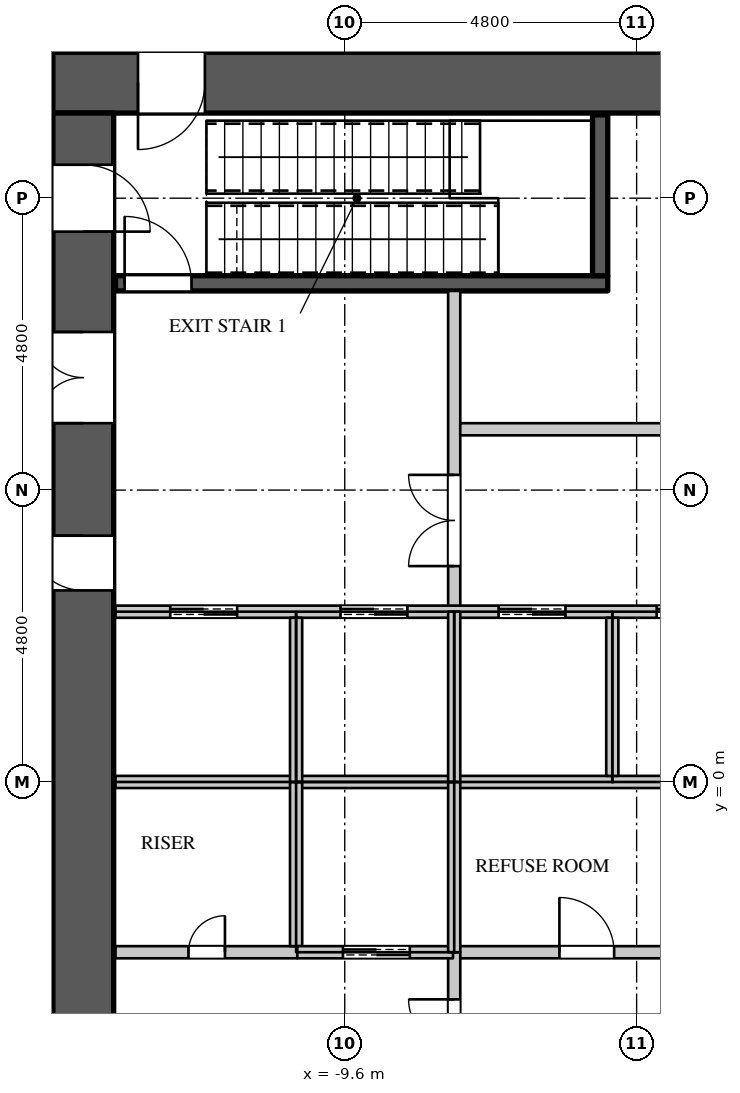
"""IFC4 building model, lengths in metres.
Left out: names, types, materials, properties, quantities, classifications, styles, units other than length and angle.
Written with IfcOpenShell. Run it as: python <this file> out.ifc"""

import sys

from ifc_helpers import new_model, si_unit, direction, frame, frame_2d, origin, place, context, subcontext, project, spatial, rectangle, extrude, element, fill, save


model = new_model("IFC4")
c1 = context("Model", 3, precision=1e-05, world=origin(), true_north=direction((0.0, 1.0)))
c2 = subcontext(c1, "Body", "Model", "MODEL_VIEW")
j1 = project(units=[si_unit("LENGTHUNIT", "METRE"), si_unit("PLANEANGLEUNIT", "RADIAN")], contexts=[c1])
p1 = place(None, origin())
s1 = spatial("IfcSite", under=j1, at=p1, CompositionType="ELEMENT")
p2 = place(p1, origin())
s2 = spatial("IfcBuilding", under=s1, at=p2, CompositionType="ELEMENT")
p3 = place(p2, frame((0.0, 0.0, 101.1)))
s3 = spatial("IfcBuildingStorey", under=s2, at=p3, CompositionType="ELEMENT", Elevation=101.1)
p4 = place(p3, frame((-14.4, 11.5, 0.0), z_axis=(0.0, 0.0, 1.0), x_axis=(1.0, 0.0, 0.0)))
e1 = element("IfcWall", 1, at=p4, inside=s3, PredefinedType="SHEAR", context=c2, shape_type="SweptSolid", body=[
    extrude(rectangle(XDim=28.8, YDim=1.0, at=frame_2d((14.4, 0.0))), origin(), (0.0, 0.0, 1.0), 5.4),
])
p5 = place(p4, frame((1.4, 0.0, 0.0)))
e2 = element("IfcOpeningElement", 2, at=p5, cuts=e1, PredefinedType="OPENING", context=c2, shape_type="SweptSolid", body=[
    extrude(rectangle(XDim=1.1, YDim=2.2, at=frame_2d((0.55, 1.1))), frame((0.0, 0.51, 0.0), z_axis=(0.0, -1.0, 0.0), x_axis=(1.0, 0.0, 0.0)), (0.0, 0.0, 1.0), 1.02),
])
p6 = place(p4, frame((26.3, 0.0, 0.0)))
e3 = element("IfcOpeningElement", 3, at=p6, cuts=e1, PredefinedType="OPENING", context=c2, shape_type="SweptSolid", body=[
    extrude(rectangle(XDim=1.1, YDim=2.2, at=frame_2d((0.55, 1.1))), frame((0.0, 0.51, 0.0), z_axis=(0.0, -1.0, 0.0), x_axis=(1.0, 0.0, 0.0)), (0.0, 0.0, 1.0), 1.02),
])
p7 = place(p4, frame((11.2, 0.0, 0.0)))
e4 = element("IfcOpeningElement", 4, at=p7, cuts=e1, PredefinedType="OPENING", context=c2, shape_type="SweptSolid", body=[
    extrude(rectangle(XDim=1.8, YDim=2.4, at=frame_2d((0.9, 1.2))), frame((0.0, 0.51, 0.0), z_axis=(0.0, -1.0, 0.0), x_axis=(1.0, 0.0, 0.0)), (0.0, 0.0, 1.0), 1.02),
])
p8 = place(p3, frame((-13.9, -11.0, 0.0), z_axis=(0.0, 0.0, 1.0), x_axis=(0.0, 1.0, 0.0)))
e5 = element("IfcWall", 5, at=p8, inside=s3, PredefinedType="SHEAR", context=c2, shape_type="SweptSolid", body=[
    extrude(rectangle(XDim=22.0, YDim=1.0, at=frame_2d((11.0, 0.0))), origin(), (0.0, 0.0, 1.0), 5.4),
])
p9 = place(p8, frame((16.9, 0.0, 0.0)))
e6 = element("IfcOpeningElement", 6, at=p9, cuts=e5, PredefinedType="OPENING", context=c2, shape_type="SweptSolid", body=[
    extrude(rectangle(XDim=1.5, YDim=2.4, at=frame_2d((0.75, 1.2))), frame((0.0, 0.51, 0.0), z_axis=(0.0, -1.0, 0.0), x_axis=(1.0, 0.0, 0.0)), (0.0, 0.0, 1.0), 1.02),
])
p10 = place(p8, frame((20.05, 0.0, 0.0)))
e7 = element("IfcOpeningElement", 7, at=p10, cuts=e5, PredefinedType="OPENING", context=c2, shape_type="SweptSolid", body=[
    extrude(rectangle(XDim=1.1, YDim=2.2, at=frame_2d((0.55, 1.1))), frame((0.0, 0.51, 0.0), z_axis=(0.0, -1.0, 0.0), x_axis=(1.0, 0.0, 0.0)), (0.0, 0.0, 1.0), 1.02),
])
p11 = place(p8, frame((14.15, 0.0, 0.0)))
e8 = element("IfcOpeningElement", 8, at=p11, cuts=e5, PredefinedType="OPENING", context=c2, shape_type="SweptSolid", body=[
    extrude(rectangle(XDim=0.9, YDim=2.2, at=frame_2d((0.45, 1.1))), frame((0.0, 0.51, 0.0), z_axis=(0.0, -1.0, 0.0), x_axis=(1.0, 0.0, 0.0)), (0.0, 0.0, 1.0), 1.02),
])
p12 = place(p8, frame((3.55, 0.0, 0.0)))
e9 = element("IfcOpeningElement", 9, at=p12, cuts=e5, PredefinedType="OPENING", context=c2, shape_type="SweptSolid", body=[
    extrude(rectangle(XDim=1.5, YDim=2.4, at=frame_2d((0.75, 1.2))), frame((0.0, 0.51, 0.0), z_axis=(0.0, -1.0, 0.0), x_axis=(1.0, 0.0, 0.0)), (0.0, 0.0, 1.0), 1.02),
])
p13 = place(p8, frame((0.85, 0.0, 0.0)))
e10 = element("IfcOpeningElement", 10, at=p13, cuts=e5, PredefinedType="OPENING", context=c2, shape_type="SweptSolid", body=[
    extrude(rectangle(XDim=1.1, YDim=2.2, at=frame_2d((0.55, 1.1))), frame((0.0, 0.51, 0.0), z_axis=(0.0, -1.0, 0.0), x_axis=(1.0, 0.0, 0.0)), (0.0, 0.0, 1.0), 1.02),
])
p14 = place(p3, frame((-7.82, -2.8, 0.0), z_axis=(0.0, 0.0, 1.0), x_axis=(1.0, 0.0, 0.0)))
e11 = element("IfcWall", 11, at=p14, inside=s3, PredefinedType="PARTITIONING", context=c2, shape_type="SweptSolid", body=[
    extrude(rectangle(XDim=4.44, YDim=0.2, at=frame_2d((2.22, 0.0))), origin(), (0.0, 0.0, 1.0), 5.15),
])
p15 = place(p14, frame((1.75, 0.0, 0.0)))
e12 = element("IfcOpeningElement", 12, at=p15, cuts=e11, PredefinedType="OPENING", context=c2, shape_type="SweptSolid", body=[
    extrude(rectangle(XDim=0.9, YDim=2.2, at=frame_2d((0.45, 1.1))), frame((0.0, 0.11, 0.0), z_axis=(0.0, -1.0, 0.0), x_axis=(1.0, 0.0, 0.0)), (0.0, 0.0, 1.0), 0.22),
])
p16 = place(p3, frame((-7.8, -8.075, 0.0), z_axis=(0.0, 0.0, 1.0), x_axis=(0.0, 1.0, 0.0)))
e13 = element("IfcWall", 13, at=p16, inside=s3, PredefinedType="PARTITIONING", context=c2, shape_type="SweptSolid", body=[
    extrude(rectangle(XDim=5.275, YDim=0.2, at=frame_2d((2.637, 0.0))), origin(), (0.0, 0.0, 1.0), 5.15),
])
p17 = place(p16, frame((3.0, 0.0, 0.0)))
e14 = element("IfcOpeningElement", 14, at=p17, cuts=e13, PredefinedType="OPENING", context=c2, shape_type="SweptSolid", body=[
    extrude(rectangle(XDim=1.5, YDim=2.4, at=frame_2d((0.75, 1.2))), frame((0.0, 0.11, 0.0), z_axis=(0.0, -1.0, 0.0), x_axis=(1.0, 0.0, 0.0)), (0.0, 0.0, 1.0), 0.22),
])
p18 = place(p3, frame((-7.8, 2.8, 0.0), z_axis=(0.0, 0.0, 1.0), x_axis=(0.0, 1.0, 0.0)))
e15 = element("IfcWall", 15, at=p18, inside=s3, PredefinedType="PARTITIONING", context=c2, shape_type="SweptSolid", body=[
    extrude(rectangle(XDim=5.275, YDim=0.2, at=frame_2d((2.637, 0.0))), origin(), (0.0, 0.0, 1.0), 5.15),
])
p19 = place(p18, frame((0.75, 0.0, 0.0)))
e16 = element("IfcOpeningElement", 16, at=p19, cuts=e15, PredefinedType="OPENING", context=c2, shape_type="SweptSolid", body=[
    extrude(rectangle(XDim=1.5, YDim=2.4, at=frame_2d((0.75, 1.2))), frame((0.0, 0.11, 0.0), z_axis=(0.0, -1.0, 0.0), x_axis=(1.0, 0.0, 0.0)), (0.0, 0.0, 1.0), 0.22),
])
p20 = place(p3, frame((-7.7, 5.8, 0.0), z_axis=(0.0, 0.0, 1.0), x_axis=(1.0, 0.0, 0.0)))
e17 = element("IfcWall", 17, at=p20, inside=s3, PredefinedType="PARTITIONING", context=c2, shape_type="SweptSolid", body=[
    extrude(rectangle(XDim=21.07, YDim=0.2, at=frame_2d((10.535, 0.0))), origin(), (0.0, 0.0, 1.0), 5.15),
])
p21 = place(p20, frame((3.35, 0.0, 0.0)))
e18 = element("IfcOpeningElement", 18, at=p21, cuts=e17, PredefinedType="OPENING", context=c2, shape_type="SweptSolid", body=[
    extrude(rectangle(XDim=0.9, YDim=2.2, at=frame_2d((0.45, 1.1))), frame((0.0, 0.11, 0.0), z_axis=(0.0, -1.0, 0.0), x_axis=(1.0, 0.0, 0.0)), (0.0, 0.0, 1.0), 0.22),
])
p22 = place(p20, frame((9.5, 0.0, 0.0)))
e19 = element("IfcOpeningElement", 19, at=p22, cuts=e17, PredefinedType="OPENING", context=c2, shape_type="SweptSolid", body=[
    extrude(rectangle(XDim=0.9, YDim=2.2, at=frame_2d((0.45, 1.1))), frame((0.0, 0.11, 0.0), z_axis=(0.0, -1.0, 0.0), x_axis=(1.0, 0.0, 0.0)), (0.0, 0.0, 1.0), 0.22),
])
p23 = place(p20, frame((16.25, 0.0, 0.0)))
e20 = element("IfcOpeningElement", 20, at=p23, cuts=e17, PredefinedType="OPENING", context=c2, shape_type="SweptSolid", body=[
    extrude(rectangle(XDim=0.9, YDim=2.2, at=frame_2d((0.45, 1.1))), frame((0.0, 0.11, 0.0), z_axis=(0.0, -1.0, 0.0), x_axis=(1.0, 0.0, 0.0)), (0.0, 0.0, 1.0), 0.22),
])
p24 = place(p3, frame((-13.37, -2.8, 0.0), z_axis=(0.0, 0.0, 1.0), x_axis=(1.0, 0.0, 0.0)))
e21 = element("IfcWall", 21, at=p24, inside=s3, PredefinedType="PARTITIONING", context=c2, shape_type="SweptSolid", body=[
    extrude(rectangle(XDim=2.99, YDim=0.2, at=frame_2d((1.495, 0.0))), origin(), (0.0, 0.0, 1.0), 5.15),
])
p25 = place(p24, frame((1.2, 0.0, 0.0)))
e22 = element("IfcOpeningElement", 22, at=p25, cuts=e21, PredefinedType="OPENING", context=c2, shape_type="SweptSolid", body=[
    extrude(rectangle(XDim=0.6, YDim=2.0, at=frame_2d((0.3, 1.0))), frame((0.0, 0.11, 0.0), z_axis=(0.0, -1.0, 0.0), x_axis=(1.0, 0.0, 0.0)), (0.0, 0.0, 1.0), 0.22),
])
p26 = place(p3, frame((-13.37, 0.0, 0.0), z_axis=(0.0, 0.0, 1.0), x_axis=(1.0, 0.0, 0.0)))
e23 = element("IfcWall", 23, at=p26, inside=s3, PredefinedType="PARTITIONING", context=c2, shape_type="SweptSolid", body=[
    extrude(rectangle(XDim=23.77, YDim=0.2, at=frame_2d((11.885, 0.0))), origin(), (0.0, 0.0, 1.0), 5.15),
])
p27 = place(p3, frame((-13.37, 2.8, 0.0), z_axis=(0.0, 0.0, 1.0), x_axis=(1.0, 0.0, 0.0)))
e24 = element("IfcWall", 24, at=p27, inside=s3, PredefinedType="PARTITIONING", context=c2, shape_type="SweptSolid", body=[
    extrude(rectangle(XDim=23.77, YDim=0.2, at=frame_2d((11.885, 0.0))), origin(), (0.0, 0.0, 1.0), 5.15),
])
p28 = place(p27, frame((0.9, 0.0, 0.0)))
e25 = element("IfcOpeningElement", 25, at=p28, cuts=e24, PredefinedType="OPENING", context=c2, shape_type="SweptSolid", body=[
    extrude(rectangle(XDim=1.1, YDim=2.2, at=frame_2d((0.55, 1.1))), frame((0.0, 0.11, 0.0), z_axis=(0.0, -1.0, 0.0), x_axis=(1.0, 0.0, 0.0)), (0.0, 0.0, 1.0), 0.22),
])
p29 = place(p27, frame((3.7, 0.0, 0.0)))
e26 = element("IfcOpeningElement", 26, at=p29, cuts=e24, PredefinedType="OPENING", context=c2, shape_type="SweptSolid", body=[
    extrude(rectangle(XDim=1.1, YDim=2.2, at=frame_2d((0.55, 1.1))), frame((0.0, 0.11, 0.0), z_axis=(0.0, -1.0, 0.0), x_axis=(1.0, 0.0, 0.0)), (0.0, 0.0, 1.0), 0.22),
])
p30 = place(p27, frame((6.3, 0.0, 0.0)))
e27 = element("IfcOpeningElement", 27, at=p30, cuts=e24, PredefinedType="OPENING", context=c2, shape_type="SweptSolid", body=[
    extrude(rectangle(XDim=1.1, YDim=2.2, at=frame_2d((0.55, 1.1))), frame((0.0, 0.11, 0.0), z_axis=(0.0, -1.0, 0.0), x_axis=(1.0, 0.0, 0.0)), (0.0, 0.0, 1.0), 0.22),
])
p31 = place(p27, frame((8.9, 0.0, 0.0)))
e28 = element("IfcOpeningElement", 28, at=p31, cuts=e24, PredefinedType="OPENING", context=c2, shape_type="SweptSolid", body=[
    extrude(rectangle(XDim=1.1, YDim=2.2, at=frame_2d((0.55, 1.1))), frame((0.0, 0.11, 0.0), z_axis=(0.0, -1.0, 0.0), x_axis=(1.0, 0.0, 0.0)), (0.0, 0.0, 1.0), 0.22),
])
p32 = place(p27, frame((11.5, 0.0, 0.0)))
e29 = element("IfcOpeningElement", 29, at=p32, cuts=e24, PredefinedType="OPENING", context=c2, shape_type="SweptSolid", body=[
    extrude(rectangle(XDim=1.1, YDim=2.2, at=frame_2d((0.55, 1.1))), frame((0.0, 0.11, 0.0), z_axis=(0.0, -1.0, 0.0), x_axis=(1.0, 0.0, 0.0)), (0.0, 0.0, 1.0), 0.22),
])
p33 = place(p27, frame((14.1, 0.0, 0.0)))
e30 = element("IfcOpeningElement", 30, at=p33, cuts=e24, PredefinedType="OPENING", context=c2, shape_type="SweptSolid", body=[
    extrude(rectangle(XDim=1.1, YDim=2.2, at=frame_2d((0.55, 1.1))), frame((0.0, 0.11, 0.0), z_axis=(0.0, -1.0, 0.0), x_axis=(1.0, 0.0, 0.0)), (0.0, 0.0, 1.0), 0.22),
])
p34 = place(p27, frame((16.7, 0.0, 0.0)))
e31 = element("IfcOpeningElement", 31, at=p34, cuts=e24, PredefinedType="OPENING", context=c2, shape_type="SweptSolid", body=[
    extrude(rectangle(XDim=1.1, YDim=2.2, at=frame_2d((0.55, 1.1))), frame((0.0, 0.11, 0.0), z_axis=(0.0, -1.0, 0.0), x_axis=(1.0, 0.0, 0.0)), (0.0, 0.0, 1.0), 0.22),
])
p35 = place(p27, frame((19.3, 0.0, 0.0)))
e32 = element("IfcOpeningElement", 32, at=p35, cuts=e24, PredefinedType="OPENING", context=c2, shape_type="SweptSolid", body=[
    extrude(rectangle(XDim=1.1, YDim=2.2, at=frame_2d((0.55, 1.1))), frame((0.0, 0.11, 0.0), z_axis=(0.0, -1.0, 0.0), x_axis=(1.0, 0.0, 0.0)), (0.0, 0.0, 1.0), 0.22),
])
p36 = place(p3, frame((-10.4, -2.7, 0.0), z_axis=(0.0, 0.0, 1.0), x_axis=(0.0, 1.0, 0.0)))
e33 = element("IfcWall", 33, at=p36, inside=s3, PredefinedType="PARTITIONING", context=c2, shape_type="SweptSolid", body=[
    extrude(rectangle(XDim=2.7, YDim=0.2, at=frame_2d((1.35, 0.0))), origin(), (0.0, 0.0, 1.0), 5.15),
])
p37 = place(p3, frame((-10.38, -2.8, 0.0), z_axis=(0.0, 0.0, 1.0), x_axis=(1.0, 0.0, 0.0)))
e34 = element("IfcWall", 34, at=p37, inside=s3, PredefinedType="PARTITIONING", context=c2, shape_type="SweptSolid", body=[
    extrude(rectangle(XDim=2.56, YDim=0.2, at=frame_2d((1.28, 0.0))), origin(), (0.0, 0.0, 1.0), 5.15),
])
p38 = place(p37, frame((0.75, 0.0, 0.0)))
e35 = element("IfcOpeningElement", 35, at=p38, cuts=e34, PredefinedType="OPENING", context=c2, shape_type="SweptSolid", body=[
    extrude(rectangle(XDim=1.1, YDim=2.2, at=frame_2d((0.55, 1.1))), frame((0.0, 0.11, 0.0), z_axis=(0.0, -1.0, 0.0), x_axis=(1.0, 0.0, 0.0)), (0.0, 0.0, 1.0), 0.22),
])
p39 = place(p3, frame((-10.4, 0.0, 0.0), z_axis=(0.0, 0.0, 1.0), x_axis=(0.0, 1.0, 0.0)))
e36 = element("IfcWall", 36, at=p39, inside=s3, PredefinedType="PARTITIONING", context=c2, shape_type="SweptSolid", body=[
    extrude(rectangle(XDim=2.7, YDim=0.2, at=frame_2d((1.35, 0.0))), origin(), (0.0, 0.0, 1.0), 5.15),
])
for number, where, z_axis, x_axis in (
    (37, (-7.8, -2.8, 0.0), (0.0, 0.0, 1.0), (0.0, 1.0, 0.0)),
    (38, (-7.8, 0.0, 0.0), (0.0, 0.0, 1.0), (0.0, 1.0, 0.0)),
):
    element("IfcWall", number, at=place(p3, frame(where, z_axis=z_axis, x_axis=x_axis)), inside=s3, PredefinedType="PARTITIONING", context=c2, shape_type="SweptSolid", body=[
        extrude(rectangle(XDim=2.8, YDim=0.2, at=frame_2d((1.4, 0.0))), origin(), (0.0, 0.0, 1.0), 5.15),
    ])
p40 = place(p3, frame((-5.2, 0.1, 0.0), z_axis=(0.0, 0.0, 1.0), x_axis=(0.0, 1.0, 0.0)))
e39 = element("IfcWall", 39, at=p40, inside=s3, PredefinedType="PARTITIONING", context=c2, shape_type="SweptSolid", body=[
    extrude(rectangle(XDim=2.6, YDim=0.2, at=frame_2d((1.3, 0.0))), origin(), (0.0, 0.0, 1.0), 5.15),
])
p41 = place(p3, frame((-13.37, 8.2, 0.0), z_axis=(0.0, 0.0, 1.0), x_axis=(1.0, 0.0, 0.0)))
e40 = element("IfcWall", 40, at=p41, inside=s3, PredefinedType="SHEAR", context=c2, shape_type="SweptSolid", body=[
    extrude(rectangle(XDim=8.095, YDim=0.25, at=frame_2d((4.048, 0.0))), origin(), (0.0, 0.0, 1.0), 5.15),
])
p42 = place(p41, frame((0.15, 0.0, 0.0)))
e41 = element("IfcOpeningElement", 41, at=p42, cuts=e40, PredefinedType="OPENING", context=c2, shape_type="SweptSolid", body=[
    extrude(rectangle(XDim=1.1, YDim=2.2, at=frame_2d((0.55, 1.1))), frame((0.0, 0.135, 0.0), z_axis=(0.0, -1.0, 0.0), x_axis=(1.0, 0.0, 0.0)), (0.0, 0.0, 1.0), 0.27),
])
p43 = place(p3, frame((-5.4, 8.325, 0.0), z_axis=(0.0, 0.0, 1.0), x_axis=(0.0, 1.0, 0.0)))
e42 = element("IfcWall", 42, at=p43, inside=s3, PredefinedType="SHEAR", context=c2, shape_type="SweptSolid", body=[
    extrude(rectangle(XDim=2.645, YDim=0.25, at=frame_2d((1.323, 0.0))), origin(), (0.0, 0.0, 1.0), 5.15),
])
p44 = place(p25, origin())
e43 = element("IfcDoor", 43, at=p44, inside=s3, OperationType="SINGLE_SWING_RIGHT", PredefinedType="DOOR", context=c2, shape_type="SweptSolid", body=[
    extrude(rectangle(XDim=0.6, YDim=2.0, at=frame_2d((0.3, 1.0))), frame((0.0, 0.025, 0.0), z_axis=(0.0, -1.0, 0.0), x_axis=(1.0, 0.0, 0.0)), (0.0, 0.0, 1.0), 0.05),
])
fill(e22, e43)
p45 = place(p15, origin())
e44 = element("IfcDoor", 44, at=p45, inside=s3, OperationType="SINGLE_SWING_LEFT", PredefinedType="DOOR", context=c2, shape_type="SweptSolid", body=[
    extrude(rectangle(XDim=0.9, YDim=2.2, at=frame_2d((0.45, 1.1))), frame((0.0, 0.025, 0.0), z_axis=(0.0, -1.0, 0.0), x_axis=(1.0, 0.0, 0.0)), (0.0, 0.0, 1.0), 0.05),
])
fill(e12, e44)
p46 = place(p28, origin())
e45 = element("IfcDoor", 45, at=p46, inside=s3, OperationType="DOUBLE_DOOR_SLIDING", PredefinedType="DOOR", context=c2, shape_type="SweptSolid", body=[
    extrude(rectangle(XDim=1.1, YDim=2.2, at=frame_2d((0.55, 1.1))), frame((0.0, 0.025, 0.0), z_axis=(0.0, -1.0, 0.0), x_axis=(1.0, 0.0, 0.0)), (0.0, 0.0, 1.0), 0.05),
])
fill(e25, e45)
p47 = place(p29, origin())
e46 = element("IfcDoor", 46, at=p47, inside=s3, OperationType="DOUBLE_DOOR_SLIDING", PredefinedType="DOOR", context=c2, shape_type="SweptSolid", body=[
    extrude(rectangle(XDim=1.1, YDim=2.2, at=frame_2d((0.55, 1.1))), frame((0.0, 0.025, 0.0), z_axis=(0.0, -1.0, 0.0), x_axis=(1.0, 0.0, 0.0)), (0.0, 0.0, 1.0), 0.05),
])
fill(e26, e46)
p48 = place(p38, origin())
e47 = element("IfcDoor", 47, at=p48, inside=s3, OperationType="DOUBLE_DOOR_SLIDING", PredefinedType="DOOR", context=c2, shape_type="SweptSolid", body=[
    extrude(rectangle(XDim=1.1, YDim=2.2, at=frame_2d((0.55, 1.1))), frame((0.0, 0.025, 0.0), z_axis=(0.0, -1.0, 0.0), x_axis=(1.0, 0.0, 0.0)), (0.0, 0.0, 1.0), 0.05),
])
fill(e35, e47)
p49 = place(p30, origin())
e48 = element("IfcDoor", 48, at=p49, inside=s3, OperationType="DOUBLE_DOOR_SLIDING", PredefinedType="DOOR", context=c2, shape_type="SweptSolid", body=[
    extrude(rectangle(XDim=1.1, YDim=2.2, at=frame_2d((0.55, 1.1))), frame((0.0, 0.025, 0.0), z_axis=(0.0, -1.0, 0.0), x_axis=(1.0, 0.0, 0.0)), (0.0, 0.0, 1.0), 0.05),
])
fill(e27, e48)
p50 = place(p31, origin())
e49 = element("IfcDoor", 49, at=p50, inside=s3, OperationType="DOUBLE_DOOR_SLIDING", PredefinedType="DOOR", context=c2, shape_type="SweptSolid", body=[
    extrude(rectangle(XDim=1.1, YDim=2.2, at=frame_2d((0.55, 1.1))), frame((0.0, 0.025, 0.0), z_axis=(0.0, -1.0, 0.0), x_axis=(1.0, 0.0, 0.0)), (0.0, 0.0, 1.0), 0.05),
])
fill(e28, e49)
p51 = place(p42, origin())
e50 = element("IfcDoor", 50, at=p51, inside=s3, OperationType="SINGLE_SWING_LEFT", PredefinedType="DOOR", context=c2, shape_type="SweptSolid", body=[
    extrude(rectangle(XDim=1.1, YDim=2.2, at=frame_2d((0.55, 1.1))), frame((0.0, 0.025, 0.0), z_axis=(0.0, -1.0, 0.0), x_axis=(1.0, 0.0, 0.0)), (0.0, 0.0, 1.0), 0.05),
])
fill(e41, e50)
p52 = place(p19, origin())
e51 = element("IfcDoor", 51, at=p52, inside=s3, OperationType="DOUBLE_DOOR_SINGLE_SWING", PredefinedType="DOOR", context=c2, shape_type="SweptSolid", body=[
    extrude(rectangle(XDim=1.5, YDim=2.4, at=frame_2d((0.75, 1.2))), frame((0.0, 0.025, 0.0), z_axis=(0.0, -1.0, 0.0), x_axis=(1.0, 0.0, 0.0)), (0.0, 0.0, 1.0), 0.05),
])
fill(e16, e51)
p53 = place(p17, origin())
e52 = element("IfcDoor", 52, at=p53, inside=s3, OperationType="DOUBLE_DOOR_SINGLE_SWING", PredefinedType="DOOR", context=c2, shape_type="SweptSolid", body=[
    extrude(rectangle(XDim=1.5, YDim=2.4, at=frame_2d((0.75, 1.2))), frame((0.0, 0.025, 0.0), z_axis=(0.0, -1.0, 0.0), x_axis=(1.0, 0.0, 0.0)), (0.0, 0.0, 1.0), 0.05),
])
fill(e14, e52)
p54 = place(p5, origin())
e53 = element("IfcDoor", 53, at=p54, inside=s3, OperationType="SINGLE_SWING_RIGHT", PredefinedType="DOOR", context=c2, shape_type="SweptSolid", body=[
    extrude(rectangle(XDim=1.1, YDim=2.2, at=frame_2d((0.55, 1.1))), frame((0.0, -0.445, 0.0), z_axis=(0.0, -1.0, 0.0), x_axis=(1.0, 0.0, 0.0)), (0.0, 0.0, 1.0), 0.05),
])
fill(e2, e53)
p55 = place(p9, origin())
e54 = element("IfcDoor", 54, at=p55, inside=s3, OperationType="DOUBLE_DOOR_SINGLE_SWING", PredefinedType="DOOR", context=c2, shape_type="SweptSolid", body=[
    extrude(rectangle(XDim=1.5, YDim=2.4, at=frame_2d((0.75, 1.2))), frame((0.0, 0.495, 0.0), z_axis=(0.0, -1.0, 0.0), x_axis=(1.0, 0.0, 0.0)), (0.0, 0.0, 1.0), 0.05),
])
fill(e6, e54)
p56 = place(p10, origin())
e55 = element("IfcDoor", 55, at=p56, inside=s3, OperationType="SINGLE_SWING_RIGHT", PredefinedType="DOOR", context=c2, shape_type="SweptSolid", body=[
    extrude(rectangle(XDim=1.1, YDim=2.2, at=frame_2d((0.55, 1.1))), frame((0.0, -0.445, 0.0), z_axis=(0.0, -1.0, 0.0), x_axis=(1.0, 0.0, 0.0)), (0.0, 0.0, 1.0), 0.05),
])
fill(e7, e55)
p57 = place(p11, origin())
e56 = element("IfcDoor", 56, at=p57, inside=s3, OperationType="SINGLE_SWING_RIGHT", PredefinedType="DOOR", context=c2, shape_type="SweptSolid", body=[
    extrude(rectangle(XDim=0.9, YDim=2.2, at=frame_2d((0.45, 1.1))), frame((0.0, 0.495, 0.0), z_axis=(0.0, -1.0, 0.0), x_axis=(1.0, 0.0, 0.0)), (0.0, 0.0, 1.0), 0.05),
])
fill(e8, e56)
save(model, sys.argv[1])
